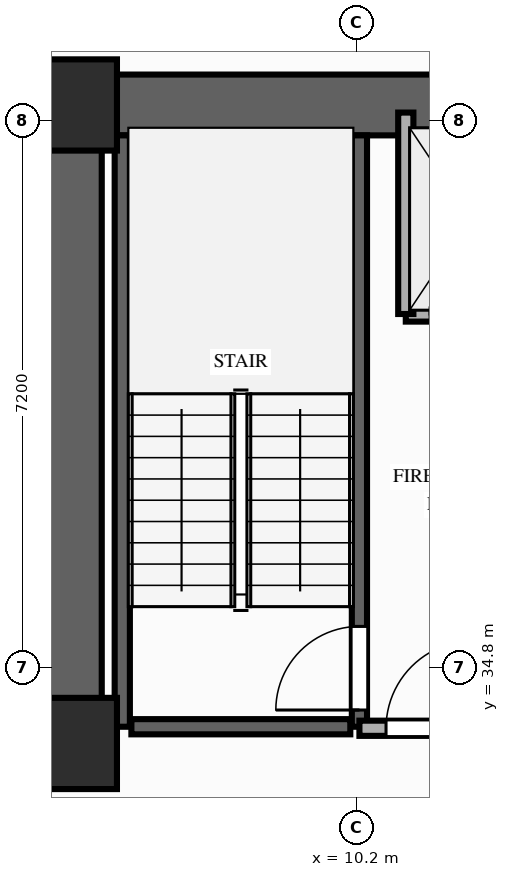
"""IFC4 building model, lengths in metres.
Left out: names, types, materials, properties, quantities, classifications, styles, units other than length and angle.
Written with IfcOpenShell. Run it as: python <this file> out.ifc"""

import sys

from ifc_helpers import new_model, si_unit, direction, frame, frame_2d, origin, origin_2d, place, context, subcontext, project, spatial, rectangle, extrude, element, fill, save


model = new_model("IFC4")
c1 = context("Model", 3, precision=1e-05, world=origin(), true_north=direction((0.0, 1.0)))
c2 = subcontext(c1, "Body", "Model", "MODEL_VIEW")
j1 = project(units=[si_unit("LENGTHUNIT", "METRE"), si_unit("PLANEANGLEUNIT", "RADIAN")], contexts=[c1])
p1 = place(None, origin())
s1 = spatial("IfcSite", under=j1, at=p1, CompositionType="ELEMENT")
p2 = place(p1, origin())
s2 = spatial("IfcBuilding", under=s1, at=p2, CompositionType="ELEMENT")
p3 = place(p2, frame((0.0, 0.0, -3.8)))
s3 = spatial("IfcBuildingStorey", under=s2, at=p3, CompositionType="ELEMENT", Elevation=-3.8)
for number, where, z_axis, x_axis in (
    (1, (6.45, 33.8, 0.0), (0.0, 0.0, 1.0), (1.0, 0.0, 0.0)),
    (2, (6.45, 42.2, 0.0), (0.0, 0.0, 1.0), (1.0, 0.0, 0.0)),
):
    element("IfcColumn", number, at=place(p3, frame(where, z_axis=z_axis, x_axis=x_axis)), inside=s3, PredefinedType="COLUMN", context=c2, shape_type="SweptSolid", body=[
        extrude(rectangle(XDim=1.2, YDim=1.2, at=origin_2d()), origin(), (0.0, 0.0, 1.0), 3.8),
    ])
p4 = place(p3, frame((6.45, 42.2, 0.0), z_axis=(0.0, 0.0, 1.0), x_axis=(1.0, 0.0, 0.0)))
e3 = element("IfcWall", 3, at=p4, inside=s3, PredefinedType="SHEAR", context=c2, shape_type="SweptSolid", body=[
    extrude(rectangle(XDim=20.45, YDim=0.8, at=frame_2d((10.225, 0.0))), origin(), (0.0, 0.0, 1.0), 3.55),
])
p5 = place(p3, frame((6.45, 33.8, 0.0), z_axis=(0.0, 0.0, 1.0), x_axis=(0.0, 1.0, 0.0)))
e4 = element("IfcWall", 4, at=p5, inside=s3, PredefinedType="SHEAR", context=c2, shape_type="SweptSolid", body=[
    extrude(rectangle(XDim=7.95, YDim=0.8, at=frame_2d((3.975, 0.0))), origin(), (0.0, 0.0, 1.0), 3.55),
])
p6 = place(p3, frame((7.12, 34.02, 0.0), z_axis=(0.0, 0.0, 1.0), x_axis=(0.0, 1.0, 0.0)))
e5 = element("IfcWall", 5, at=p6, inside=s3, PredefinedType="SHEAR", context=c2, shape_type="SweptSolid", body=[
    extrude(rectangle(XDim=7.78, YDim=0.2, at=frame_2d((3.89, 0.0))), origin(), (0.0, 0.0, 1.0), 3.55),
])
p7 = place(p3, frame((10.24, 34.02, 0.0), z_axis=(0.0, 0.0, 1.0), x_axis=(0.0, 1.0, 0.0)))
e6 = element("IfcWall", 6, at=p7, inside=s3, PredefinedType="SHEAR", context=c2, shape_type="SweptSolid", body=[
    extrude(rectangle(XDim=7.78, YDim=0.2, at=frame_2d((3.89, 0.0))), origin(), (0.0, 0.0, 1.0), 3.55),
])
p8 = place(p7, frame((0.22, 0.0, 0.0)))
e7 = element("IfcOpeningElement", 7, at=p8, cuts=e6, PredefinedType="OPENING", context=c2, shape_type="SweptSolid", body=[
    extrude(rectangle(XDim=1.1, YDim=2.15, at=frame_2d((0.55, 1.075))), frame((0.0, 0.11, 0.0), z_axis=(0.0, -1.0, 0.0), x_axis=(1.0, 0.0, 0.0)), (0.0, 0.0, 1.0), 0.22),
])
p9 = place(p3, frame((7.24, 34.02, 0.0), z_axis=(0.0, 0.0, 1.0), x_axis=(1.0, 0.0, 0.0)))
e8 = element("IfcWall", 8, at=p9, inside=s3, PredefinedType="SHEAR", context=c2, shape_type="SweptSolid", body=[
    extrude(rectangle(XDim=2.88, YDim=0.2, at=frame_2d((1.44, 0.0))), origin(), (0.0, 0.0, 1.0), 3.55),
])
p10 = place(p3, frame((10.85, 39.45, 0.0), z_axis=(0.0, 0.0, 1.0), x_axis=(1.0, 0.0, 0.0)))
e9 = element("IfcWall", 9, at=p10, inside=s3, PredefinedType="MOVABLE", context=c2, shape_type="SweptSolid", body=[
    extrude(rectangle(XDim=1.7, YDim=0.2, at=frame_2d((0.85, 0.0))), origin(), (0.0, 0.0, 1.0), 3.55),
])
p11 = place(p10, frame((0.32, 0.0, 0.0)))
e10 = element("IfcOpeningElement", 10, at=p11, cuts=e9, PredefinedType="OPENING", context=c2, shape_type="SweptSolid", body=[
    extrude(rectangle(XDim=1.05, YDim=2.15, at=frame_2d((0.525, 1.075))), frame((0.0, 0.11, 0.0), z_axis=(0.0, -1.0, 0.0), x_axis=(1.0, 0.0, 0.0)), (0.0, 0.0, 1.0), 0.22),
])
p12 = place(p3, frame((10.85, 39.45, 0.0), z_axis=(0.0, 0.0, 1.0), x_axis=(0.0, 1.0, 0.0)))
e11 = element("IfcWall", 11, at=p12, inside=s3, PredefinedType="MOVABLE", context=c2, shape_type="SweptSolid", body=[
    extrude(rectangle(XDim=2.65, YDim=0.2, at=frame_2d((1.325, 0.0))), origin(), (0.0, 0.0, 1.0), 3.55),
])
p13 = place(p3, frame((10.24, 34.0, 0.0), z_axis=(0.0, 0.0, 1.0), x_axis=(1.0, 0.0, 0.0)))
e12 = element("IfcWall", 12, at=p13, inside=s3, PredefinedType="PARTITIONING", context=c2, shape_type="SweptSolid", body=[
    extrude(rectangle(XDim=2.66, YDim=0.2, at=frame_2d((1.33, 0.0))), origin(), (0.0, 0.0, 1.0), 2.74),
])
p14 = place(p13, frame((0.35, 0.0, 0.0)))
e13 = element("IfcOpeningElement", 13, at=p14, cuts=e12, PredefinedType="OPENING", context=c2, shape_type="SweptSolid", body=[
    extrude(rectangle(XDim=1.15, YDim=2.15, at=frame_2d((0.575, 1.075))), frame((0.0, 0.11, 0.0), z_axis=(0.0, -1.0, 0.0), x_axis=(1.0, 0.0, 0.0)), (0.0, 0.0, 1.0), 0.22),
])
p15 = place(p8, origin())
e14 = element("IfcDoor", 14, at=p15, inside=s3, OperationType="SINGLE_SWING_LEFT", PredefinedType="DOOR", context=c2, shape_type="SweptSolid", body=[
    extrude(rectangle(XDim=1.1, YDim=2.15, at=frame_2d((0.55, 1.075))), frame((0.0, 0.025, 0.0), z_axis=(0.0, -1.0, 0.0), x_axis=(1.0, 0.0, 0.0)), (0.0, 0.0, 1.0), 0.05),
])
fill(e7, e14)
p16 = place(p14, origin())
e15 = element("IfcDoor", 15, at=p16, inside=s3, OperationType="SINGLE_SWING_RIGHT", PredefinedType="DOOR", context=c2, shape_type="SweptSolid", body=[
    extrude(rectangle(XDim=1.15, YDim=2.15, at=frame_2d((0.575, 1.075))), frame((0.0, 0.025, 0.0), z_axis=(0.0, -1.0, 0.0), x_axis=(1.0, 0.0, 0.0)), (0.0, 0.0, 1.0), 0.05),
])
fill(e13, e15)
save(model, sys.argv[1])
